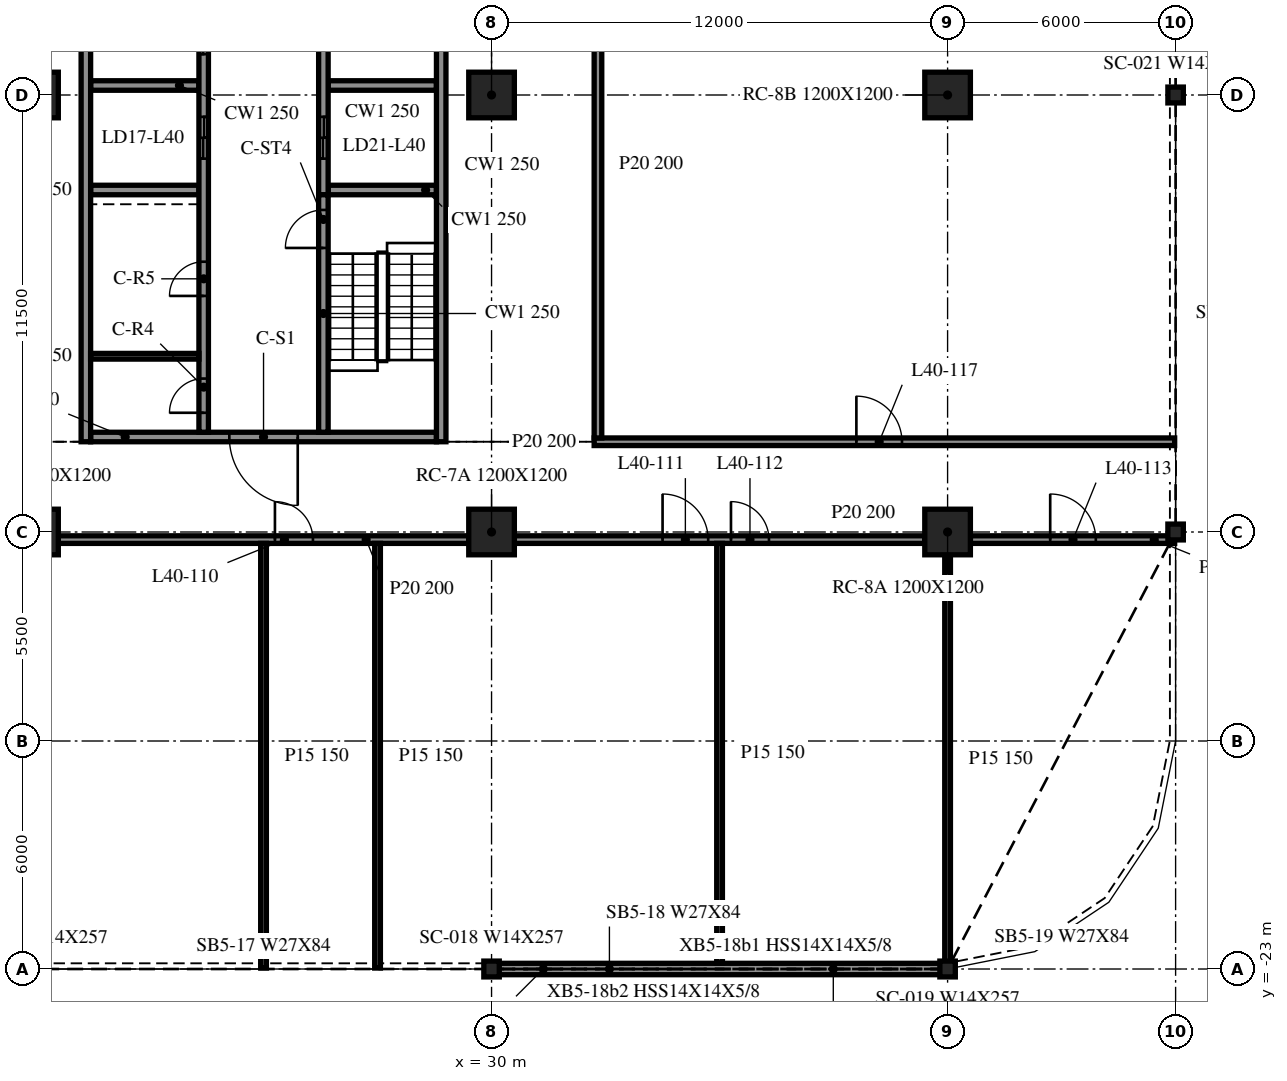
"""IFC4 building model, lengths in metres.
Left out: names, types, materials, properties, quantities, classifications, styles, units other than length and angle.
Written with IfcOpenShell. Run it as: python <this file> out.ifc"""

import sys

from ifc_helpers import new_model, si_unit, direction, frame, frame_2d, origin, origin_2d, place, context, subcontext, project, spatial, rectangle, i_section, extrude, element, fill, save


model = new_model("IFC4")
c1 = context("Model", 3, precision=1e-05, world=origin(), true_north=direction((0.0, 1.0)))
c2 = subcontext(c1, "Body", "Model", "MODEL_VIEW")
j1 = project(units=[si_unit("LENGTHUNIT", "METRE"), si_unit("PLANEANGLEUNIT", "RADIAN")], contexts=[c1])
p1 = place(None, origin())
s1 = spatial("IfcSite", under=j1, at=p1, CompositionType="ELEMENT")
p2 = place(p1, origin())
s2 = spatial("IfcBuilding", under=s1, at=p2, CompositionType="ELEMENT")
p3 = place(p2, frame((0.0, 0.0, 170.6)))
s3 = spatial("IfcBuildingStorey", under=s2, at=p3, CompositionType="ELEMENT", Elevation=170.6)
for number, where, z_axis, x_axis in (
    (1, (18.0, -11.5, -0.34), (0.0, 0.0, 1.0), (1.0, 0.0, 0.0)),
    (2, (18.0, 0.0, -0.34), (0.0, 0.0, 1.0), (1.0, 0.0, 0.0)),
    (3, (30.0, -11.5, -0.34), (0.0, 0.0, 1.0), (1.0, 0.0, 0.0)),
    (4, (30.0, 0.0, -0.34), (0.0, 0.0, 1.0), (1.0, 0.0, 0.0)),
    (5, (42.0, -11.5, -0.34), (0.0, 0.0, 1.0), (1.0, 0.0, 0.0)),
    (6, (42.0, 0.0, -0.34), (0.0, 0.0, 1.0), (1.0, 0.0, 0.0)),
):
    element("IfcColumn", number, at=place(p3, frame(where, z_axis=z_axis, x_axis=x_axis)), inside=s3, PredefinedType="COLUMN", context=c2, shape_type="SweptSolid", body=[
        extrude(rectangle(XDim=1.2, YDim=1.2, at=origin_2d()), origin(), (0.0, 0.0, 1.0), 3.8),
    ])
for number, where, z_axis, x_axis in (
    (7, (30.0, -23.0, -0.34), (0.0, 0.0, 1.0), (1.0, 0.0, 0.0)),
    (8, (42.0, -23.0, -0.34), (0.0, 0.0, 1.0), (1.0, 0.0, 0.0)),
    (9, (48.0, -11.5, -0.34), (0.0, 0.0, 1.0), (1.0, 0.0, 0.0)),
    (10, (48.0, 0.0, -0.34), (0.0, 0.0, 1.0), (1.0, 0.0, 0.0)),
):
    element("IfcColumn", number, at=place(p3, frame(where, z_axis=z_axis, x_axis=x_axis)), inside=s3, PredefinedType="COLUMN", context=c2, shape_type="SweptSolid", body=[
        extrude(i_section(OverallWidth=0.406, OverallDepth=0.417, WebThickness=0.03, FlangeThickness=0.048, at=origin_2d()), origin(), (0.0, 0.0, 1.0), 3.8),
    ])
p4 = place(p3, frame((30.015, -23.0, 0.0), z_axis=(0.0, 0.0, 1.0), x_axis=(1.0, 0.0, 0.0)))
e11 = element("IfcWall", 11, at=p4, inside=s3, PredefinedType="NOTDEFINED", context=c2, shape_type="SweptSolid", body=[
    extrude(rectangle(XDim=11.97, YDim=0.3, at=frame_2d((5.985, 0.0))), origin(), (0.0, 0.0, 1.0), 2.782),
])
p5 = place(p3, frame((19.325, 15.125, 0.0), z_axis=(0.0, 0.0, 1.0), x_axis=(0.0, -1.0, 0.0)))
e12 = element("IfcWall", 12, at=p5, inside=s3, PredefinedType="SOLIDWALL", context=c2, shape_type="SweptSolid", body=[
    extrude(rectangle(XDim=24.25, YDim=0.25, at=frame_2d((12.125, 0.0))), origin(), (0.0, 0.0, 1.0), 3.46),
])
p6 = place(p3, frame((28.675, -9.125, 0.0), z_axis=(0.0, 0.0, 1.0), x_axis=(0.0, 1.0, 0.0)))
e13 = element("IfcWall", 13, at=p6, inside=s3, PredefinedType="SOLIDWALL", context=c2, shape_type="SweptSolid", body=[
    extrude(rectangle(XDim=24.25, YDim=0.25, at=frame_2d((12.125, 0.0))), origin(), (0.0, 0.0, 1.0), 3.46),
])
p7 = place(p6, frame((13.075, 0.0, 0.0)))
e14 = element("IfcOpeningElement", 14, at=p7, cuts=e13, PredefinedType="OPENING", context=c2, shape_type="SweptSolid", body=[
    extrude(rectangle(XDim=0.9, YDim=2.1, at=frame_2d((0.45, 1.05))), frame((0.0, 0.135, 0.0), z_axis=(0.0, -1.0, 0.0), x_axis=(1.0, 0.0, 0.0)), (0.0, 0.0, 1.0), 0.27),
])
p8 = place(p6, frame((15.775, 0.0, 0.0)))
e15 = element("IfcOpeningElement", 15, at=p8, cuts=e13, PredefinedType="OPENING", context=c2, shape_type="SweptSolid", body=[
    extrude(rectangle(XDim=0.9, YDim=2.1, at=frame_2d((0.45, 1.05))), frame((0.0, 0.135, 0.0), z_axis=(0.0, -1.0, 0.0), x_axis=(1.0, 0.0, 0.0)), (0.0, 0.0, 1.0), 0.27),
])
p9 = place(p6, frame((19.125, 0.0, 0.0)))
e16 = element("IfcOpeningElement", 16, at=p9, cuts=e13, PredefinedType="OPENING", context=c2, shape_type="SweptSolid", body=[
    extrude(rectangle(XDim=0.9, YDim=2.1, at=frame_2d((0.45, 1.05))), frame((0.0, 0.135, 0.0), z_axis=(0.0, -1.0, 0.0), x_axis=(1.0, 0.0, 0.0)), (0.0, 0.0, 1.0), 0.27),
])
p10 = place(p6, frame((22.327, 0.0, 0.0)))
e17 = element("IfcOpeningElement", 17, at=p10, cuts=e13, PredefinedType="OPENING", context=c2, shape_type="SweptSolid", body=[
    extrude(rectangle(XDim=0.9, YDim=2.1, at=frame_2d((0.45, 1.05))), frame((0.0, 0.135, 0.0), z_axis=(0.0, -1.0, 0.0), x_axis=(1.0, 0.0, 0.0)), (0.0, 0.0, 1.0), 0.27),
])
p11 = place(p3, frame((28.55, -9.0, 0.0), z_axis=(0.0, 0.0, 1.0), x_axis=(-1.0, 0.0, 0.0)))
e18 = element("IfcWall", 18, at=p11, inside=s3, PredefinedType="SOLIDWALL", context=c2, shape_type="SweptSolid", body=[
    extrude(rectangle(XDim=9.1, YDim=0.25, at=frame_2d((4.55, 0.0))), origin(), (0.0, 0.0, 1.0), 3.46),
])
p12 = place(p11, frame((3.65, 0.0, 0.0)))
e19 = element("IfcOpeningElement", 19, at=p12, cuts=e18, PredefinedType="OPENING", context=c2, shape_type="SweptSolid", body=[
    extrude(rectangle(XDim=1.8, YDim=2.1, at=frame_2d((0.9, 1.05))), frame((0.0, 0.135, 0.0), z_axis=(0.0, -1.0, 0.0), x_axis=(1.0, 0.0, 0.0)), (0.0, 0.0, 1.0), 0.27),
])
p13 = place(p3, frame((22.425, -8.875, 0.0), z_axis=(0.0, 0.0, 1.0), x_axis=(0.0, 1.0, 0.0)))
e20 = element("IfcWall", 20, at=p13, inside=s3, PredefinedType="SOLIDWALL", context=c2, shape_type="SweptSolid", body=[
    extrude(rectangle(XDim=17.5, YDim=0.25, at=frame_2d((8.75, 0.0))), origin(), (0.0, 0.0, 1.0), 3.46),
])
p14 = place(p13, frame((7.2, 0.0, 0.0)))
e21 = element("IfcOpeningElement", 21, at=p14, cuts=e20, PredefinedType="OPENING", context=c2, shape_type="SweptSolid", body=[
    extrude(rectangle(XDim=1.1, YDim=2.1, at=frame_2d((0.55, 1.05))), frame((0.0, 0.135, 0.0), z_axis=(0.0, -1.0, 0.0), x_axis=(1.0, 0.0, 0.0)), (0.0, 0.0, 1.0), 0.27),
])
p15 = place(p13, frame((9.95, 0.0, 0.0)))
e22 = element("IfcOpeningElement", 22, at=p15, cuts=e20, PredefinedType="OPENING", context=c2, shape_type="SweptSolid", body=[
    extrude(rectangle(XDim=1.1, YDim=2.1, at=frame_2d((0.55, 1.05))), frame((0.0, 0.135, 0.0), z_axis=(0.0, -1.0, 0.0), x_axis=(1.0, 0.0, 0.0)), (0.0, 0.0, 1.0), 0.27),
])
p16 = place(p13, frame((12.7, 0.0, 0.0)))
e23 = element("IfcOpeningElement", 23, at=p16, cuts=e20, PredefinedType="OPENING", context=c2, shape_type="SweptSolid", body=[
    extrude(rectangle(XDim=1.1, YDim=2.1, at=frame_2d((0.55, 1.05))), frame((0.0, 0.135, 0.0), z_axis=(0.0, -1.0, 0.0), x_axis=(1.0, 0.0, 0.0)), (0.0, 0.0, 1.0), 0.27),
])
p17 = place(p13, frame((15.45, 0.0, 0.0)))
e24 = element("IfcOpeningElement", 24, at=p17, cuts=e20, PredefinedType="OPENING", context=c2, shape_type="SweptSolid", body=[
    extrude(rectangle(XDim=1.1, YDim=2.1, at=frame_2d((0.55, 1.05))), frame((0.0, 0.135, 0.0), z_axis=(0.0, -1.0, 0.0), x_axis=(1.0, 0.0, 0.0)), (0.0, 0.0, 1.0), 0.27),
])
p18 = place(p13, frame((0.512, 0.0, 0.0)))
e25 = element("IfcOpeningElement", 25, at=p18, cuts=e20, PredefinedType="OPENING", context=c2, shape_type="SweptSolid", body=[
    extrude(rectangle(XDim=0.9, YDim=2.1, at=frame_2d((0.45, 1.05))), frame((0.0, 0.135, 0.0), z_axis=(0.0, -1.0, 0.0), x_axis=(1.0, 0.0, 0.0)), (0.0, 0.0, 1.0), 0.27),
])
p19 = place(p13, frame((3.587, 0.0, 0.0)))
e26 = element("IfcOpeningElement", 26, at=p19, cuts=e20, PredefinedType="OPENING", context=c2, shape_type="SweptSolid", body=[
    extrude(rectangle(XDim=0.9, YDim=2.1, at=frame_2d((0.45, 1.05))), frame((0.0, 0.135, 0.0), z_axis=(0.0, -1.0, 0.0), x_axis=(1.0, 0.0, 0.0)), (0.0, 0.0, 1.0), 0.27),
])
p20 = place(p3, frame((25.575, -8.875, 0.0), z_axis=(0.0, 0.0, 1.0), x_axis=(0.0, 1.0, 0.0)))
e27 = element("IfcWall", 27, at=p20, inside=s3, PredefinedType="SOLIDWALL", context=c2, shape_type="SweptSolid", body=[
    extrude(rectangle(XDim=6.25, YDim=0.25, at=frame_2d((3.125, 0.0))), origin(), (0.0, 0.0, 1.0), 3.46),
])
p21 = place(p20, frame((4.85, 0.0, 0.0)))
e28 = element("IfcOpeningElement", 28, at=p21, cuts=e27, PredefinedType="OPENING", context=c2, shape_type="SweptSolid", body=[
    extrude(rectangle(XDim=1.0, YDim=2.1, at=frame_2d((0.5, 1.05))), frame((0.0, 0.135, 0.0), z_axis=(0.0, -1.0, 0.0), x_axis=(1.0, 0.0, 0.0)), (0.0, 0.0, 1.0), 0.27),
])
p22 = place(p3, frame((25.575, 14.875, 0.0), z_axis=(0.0, 0.0, 1.0), x_axis=(0.0, -1.0, 0.0)))
e29 = element("IfcWall", 29, at=p22, inside=s3, PredefinedType="SOLIDWALL", context=c2, shape_type="SweptSolid", body=[
    extrude(rectangle(XDim=17.5, YDim=0.25, at=frame_2d((8.75, 0.0))), origin(), (0.0, 0.0, 1.0), 3.46),
])
p23 = place(p22, frame((15.45, 0.0, 0.0)))
e30 = element("IfcOpeningElement", 30, at=p23, cuts=e29, PredefinedType="OPENING", context=c2, shape_type="SweptSolid", body=[
    extrude(rectangle(XDim=1.1, YDim=2.1, at=frame_2d((0.55, 1.05))), frame((0.0, 0.135, 0.0), z_axis=(0.0, -1.0, 0.0), x_axis=(1.0, 0.0, 0.0)), (0.0, 0.0, 1.0), 0.27),
])
p24 = place(p22, frame((12.8, 0.0, 0.0)))
e31 = element("IfcOpeningElement", 31, at=p24, cuts=e29, PredefinedType="OPENING", context=c2, shape_type="SweptSolid", body=[
    extrude(rectangle(XDim=0.9, YDim=2.1, at=frame_2d((0.45, 1.05))), frame((0.0, 0.135, 0.0), z_axis=(0.0, -1.0, 0.0), x_axis=(1.0, 0.0, 0.0)), (0.0, 0.0, 1.0), 0.27),
])
for number, where, z_axis, x_axis in (
    (32, (19.45, -2.5, 0.0), (0.0, 0.0, 1.0), (1.0, 0.0, 0.0)),
    (33, (19.45, 0.25, 0.0), (0.0, 0.0, 1.0), (1.0, 0.0, 0.0)),
    (34, (25.7, -2.5, 0.0), (0.0, 0.0, 1.0), (1.0, 0.0, 0.0)),
    (35, (25.7, 0.25, 0.0), (0.0, 0.0, 1.0), (1.0, 0.0, 0.0)),
):
    element("IfcWall", number, at=place(p3, frame(where, z_axis=z_axis, x_axis=x_axis)), inside=s3, PredefinedType="SOLIDWALL", context=c2, shape_type="SweptSolid", body=[
        extrude(rectangle(XDim=2.85, YDim=0.25, at=frame_2d((1.425, 0.0))), origin(), (0.0, 0.0, 1.0), 3.46),
    ])
p25 = place(p3, frame((19.45, -6.875, 0.0), z_axis=(0.0, 0.0, 1.0), x_axis=(1.0, 0.0, 0.0)))
e36 = element("IfcWall", 36, at=p25, inside=s3, PredefinedType="PARTITIONING", context=c2, shape_type="SweptSolid", body=[
    extrude(rectangle(XDim=2.85, YDim=0.15, at=frame_2d((1.425, 0.0))), origin(), (0.0, 0.0, 1.0), 3.46),
])
p26 = place(p3, frame((18.6, -11.7, 0.0), z_axis=(0.0, 0.0, 1.0), x_axis=(1.0, 0.0, 0.0)))
e37 = element("IfcWall", 37, at=p26, inside=s3, PredefinedType="PARTITIONING", context=c2, shape_type="SweptSolid", body=[
    extrude(rectangle(XDim=10.8, YDim=0.2, at=frame_2d((5.4, 0.0))), origin(), (0.0, 0.0, 1.0), 3.46),
])
p27 = place(p26, frame((5.7, 0.0, 0.0)))
e38 = element("IfcOpeningElement", 38, at=p27, cuts=e37, PredefinedType="OPENING", context=c2, shape_type="SweptSolid", body=[
    extrude(rectangle(XDim=1.0, YDim=2.1, at=frame_2d((0.5, 1.05))), frame((0.0, 0.11, 0.0), z_axis=(0.0, -1.0, 0.0), x_axis=(1.0, 0.0, 0.0)), (0.0, 0.0, 1.0), 0.22),
])
p28 = place(p3, frame((30.6, -11.7, 0.0), z_axis=(0.0, 0.0, 1.0), x_axis=(1.0, 0.0, 0.0)))
e39 = element("IfcWall", 39, at=p28, inside=s3, PredefinedType="PARTITIONING", context=c2, shape_type="SweptSolid", body=[
    extrude(rectangle(XDim=10.8, YDim=0.2, at=frame_2d((5.4, 0.0))), origin(), (0.0, 0.0, 1.0), 3.46),
])
p29 = place(p28, frame((3.9, 0.0, 0.0)))
e40 = element("IfcOpeningElement", 40, at=p29, cuts=e39, PredefinedType="OPENING", context=c2, shape_type="SweptSolid", body=[
    extrude(rectangle(XDim=1.2, YDim=2.1, at=frame_2d((0.6, 1.05))), frame((0.0, 0.11, 0.0), z_axis=(0.0, -1.0, 0.0), x_axis=(1.0, 0.0, 0.0)), (0.0, 0.0, 1.0), 0.22),
])
p30 = place(p28, frame((5.7, 0.0, 0.0)))
e41 = element("IfcOpeningElement", 41, at=p30, cuts=e39, PredefinedType="OPENING", context=c2, shape_type="SweptSolid", body=[
    extrude(rectangle(XDim=1.0, YDim=2.1, at=frame_2d((0.5, 1.05))), frame((0.0, 0.11, 0.0), z_axis=(0.0, -1.0, 0.0), x_axis=(1.0, 0.0, 0.0)), (0.0, 0.0, 1.0), 0.22),
])
p31 = place(p3, frame((42.6, -11.7, 0.0), z_axis=(0.0, 0.0, 1.0), x_axis=(1.0, 0.0, 0.0)))
e42 = element("IfcWall", 42, at=p31, inside=s3, PredefinedType="PARTITIONING", context=c2, shape_type="SweptSolid", body=[
    extrude(rectangle(XDim=5.375, YDim=0.2, at=frame_2d((2.688, 0.0))), origin(), (0.0, 0.0, 1.0), 3.46),
])
p32 = place(p31, frame((2.1, 0.0, 0.0)))
e43 = element("IfcOpeningElement", 43, at=p32, cuts=e42, PredefinedType="OPENING", context=c2, shape_type="SweptSolid", body=[
    extrude(rectangle(XDim=1.2, YDim=2.1, at=frame_2d((0.6, 1.05))), frame((0.0, 0.11, 0.0), z_axis=(0.0, -1.0, 0.0), x_axis=(1.0, 0.0, 0.0)), (0.0, 0.0, 1.0), 0.22),
])
p33 = place(p3, frame((32.7, -9.125, 0.0), z_axis=(0.0, 0.0, 1.0), x_axis=(1.0, 0.0, 0.0)))
e44 = element("IfcWall", 44, at=p33, inside=s3, PredefinedType="PARTITIONING", context=c2, shape_type="SweptSolid", body=[
    extrude(rectangle(XDim=15.275, YDim=0.2, at=frame_2d((7.638, 0.0))), origin(), (0.0, 0.0, 1.0), 3.46),
])
p34 = place(p33, frame((6.9, 0.0, 0.0)))
e45 = element("IfcOpeningElement", 45, at=p34, cuts=e44, PredefinedType="OPENING", context=c2, shape_type="SweptSolid", body=[
    extrude(rectangle(XDim=1.2, YDim=2.1, at=frame_2d((0.6, 1.05))), frame((0.0, 0.11, 0.0), z_axis=(0.0, -1.0, 0.0), x_axis=(1.0, 0.0, 0.0)), (0.0, 0.0, 1.0), 0.22),
])
for number, where, z_axis, x_axis in (
    (46, (24.0, -22.975, 0.0), (0.0, 0.0, 1.0), (0.0, 1.0, 0.0)),
    (47, (27.0, -22.975, 0.0), (0.0, 0.0, 1.0), (0.0, 1.0, 0.0)),
):
    element("IfcWall", number, at=place(p3, frame(where, z_axis=z_axis, x_axis=x_axis)), inside=s3, PredefinedType="PARTITIONING", context=c2, shape_type="SweptSolid", body=[
        extrude(rectangle(XDim=11.175, YDim=0.15, at=frame_2d((5.587, 0.0))), origin(), (0.0, 0.0, 1.0), 3.46),
    ])
p35 = place(p3, frame((32.8, -9.025, 0.0), z_axis=(0.0, 0.0, 1.0), x_axis=(0.0, 1.0, 0.0)))
e48 = element("IfcWall", 48, at=p35, inside=s3, PredefinedType="PARTITIONING", context=c2, shape_type="SweptSolid", body=[
    extrude(rectangle(XDim=24.05, YDim=0.2, at=frame_2d((12.025, 0.0))), origin(), (0.0, 0.0, 1.0), 3.46),
])
p36 = place(p35, frame((12.3, 0.0, 0.0)))
e49 = element("IfcOpeningElement", 49, at=p36, cuts=e48, PredefinedType="OPENING", context=c2, shape_type="SweptSolid", body=[
    extrude(rectangle(XDim=1.0, YDim=2.1, at=frame_2d((0.5, 1.05))), frame((0.0, 0.11, 0.0), z_axis=(0.0, -1.0, 0.0), x_axis=(1.0, 0.0, 0.0)), (0.0, 0.0, 1.0), 0.22),
])
p37 = place(p3, frame((36.0, -22.85, 0.0), z_axis=(0.0, 0.0, 1.0), x_axis=(0.0, 1.0, 0.0)))
e50 = element("IfcWall", 50, at=p37, inside=s3, PredefinedType="PARTITIONING", context=c2, shape_type="SweptSolid", body=[
    extrude(rectangle(XDim=11.05, YDim=0.15, at=frame_2d((5.525, 0.0))), origin(), (0.0, 0.0, 1.0), 3.46),
])
p38 = place(p3, frame((42.0, -22.847, 0.0), z_axis=(0.0, 0.0, 1.0), x_axis=(0.0, 1.0, 0.0)))
e51 = element("IfcWall", 51, at=p38, inside=s3, PredefinedType="PARTITIONING", context=c2, shape_type="SweptSolid", body=[
    extrude(rectangle(XDim=10.747, YDim=0.15, at=frame_2d((5.374, 0.0))), origin(), (0.0, 0.0, 1.0), 3.46),
])
p39 = place(p12, origin())
e52 = element("IfcDoor", 52, at=p39, inside=s3, OperationType="DOUBLE_DOOR_SINGLE_SWING", PredefinedType="DOOR", context=c2, shape_type="SweptSolid", body=[
    extrude(rectangle(XDim=1.8, YDim=2.1, at=frame_2d((0.9, 1.05))), frame((0.0, 0.025, 0.0), z_axis=(0.0, -1.0, 0.0), x_axis=(1.0, 0.0, 0.0)), (0.0, 0.0, 1.0), 0.05),
])
fill(e19, e52)
p40 = place(p23, origin())
e53 = element("IfcDoor", 53, at=p40, inside=s3, OperationType="DOUBLE_DOOR_SLIDING", PredefinedType="DOOR", context=c2, shape_type="SweptSolid", body=[
    extrude(rectangle(XDim=1.1, YDim=2.1, at=frame_2d((0.55, 1.05))), frame((0.0, 0.025, 0.0), z_axis=(0.0, -1.0, 0.0), x_axis=(1.0, 0.0, 0.0)), (0.0, 0.0, 1.0), 0.05),
])
fill(e30, e53)
p41 = place(p14, origin())
e54 = element("IfcDoor", 54, at=p41, inside=s3, OperationType="DOUBLE_DOOR_SLIDING", PredefinedType="DOOR", context=c2, shape_type="SweptSolid", body=[
    extrude(rectangle(XDim=1.1, YDim=2.1, at=frame_2d((0.55, 1.05))), frame((0.0, 0.025, 0.0), z_axis=(0.0, -1.0, 0.0), x_axis=(1.0, 0.0, 0.0)), (0.0, 0.0, 1.0), 0.05),
])
fill(e21, e54)
p42 = place(p15, origin())
e55 = element("IfcDoor", 55, at=p42, inside=s3, OperationType="DOUBLE_DOOR_SLIDING", PredefinedType="DOOR", context=c2, shape_type="SweptSolid", body=[
    extrude(rectangle(XDim=1.1, YDim=2.1, at=frame_2d((0.55, 1.05))), frame((0.0, 0.025, 0.0), z_axis=(0.0, -1.0, 0.0), x_axis=(1.0, 0.0, 0.0)), (0.0, 0.0, 1.0), 0.05),
])
fill(e22, e55)
p43 = place(p18, origin())
e56 = element("IfcDoor", 56, at=p43, inside=s3, OperationType="SINGLE_SWING_RIGHT", PredefinedType="DOOR", context=c2, shape_type="SweptSolid", body=[
    extrude(rectangle(XDim=0.9, YDim=2.1, at=frame_2d((0.45, 1.05))), frame((0.0, 0.025, 0.0), z_axis=(0.0, -1.0, 0.0), x_axis=(1.0, 0.0, 0.0)), (0.0, 0.0, 1.0), 0.05),
])
fill(e25, e56)
p44 = place(p19, origin())
e57 = element("IfcDoor", 57, at=p44, inside=s3, OperationType="SINGLE_SWING_LEFT", PredefinedType="DOOR", context=c2, shape_type="SweptSolid", body=[
    extrude(rectangle(XDim=0.9, YDim=2.1, at=frame_2d((0.45, 1.05))), frame((0.0, 0.025, 0.0), z_axis=(0.0, -1.0, 0.0), x_axis=(1.0, 0.0, 0.0)), (0.0, 0.0, 1.0), 0.05),
])
fill(e26, e57)
p45 = place(p21, origin())
e58 = element("IfcDoor", 58, at=p45, inside=s3, OperationType="SINGLE_SWING_LEFT", PredefinedType="DOOR", context=c2, shape_type="SweptSolid", body=[
    extrude(rectangle(XDim=1.0, YDim=2.1, at=frame_2d((0.5, 1.05))), frame((0.0, 0.025, 0.0), z_axis=(0.0, -1.0, 0.0), x_axis=(1.0, 0.0, 0.0)), (0.0, 0.0, 1.0), 0.05),
])
fill(e28, e58)
p46 = place(p27, origin())
e59 = element("IfcDoor", 59, at=p46, inside=s3, OperationType="SINGLE_SWING_LEFT", PredefinedType="DOOR", context=c2, shape_type="SweptSolid", body=[
    extrude(rectangle(XDim=1.0, YDim=2.1, at=frame_2d((0.5, 1.05))), frame((0.0, 0.025, 0.0), z_axis=(0.0, -1.0, 0.0), x_axis=(1.0, 0.0, 0.0)), (0.0, 0.0, 1.0), 0.05),
])
fill(e38, e59)
p47 = place(p29, origin())
e60 = element("IfcDoor", 60, at=p47, inside=s3, OperationType="SINGLE_SWING_RIGHT", PredefinedType="DOOR", context=c2, shape_type="SweptSolid", body=[
    extrude(rectangle(XDim=1.2, YDim=2.1, at=frame_2d((0.6, 1.05))), frame((0.0, 0.025, 0.0), z_axis=(0.0, -1.0, 0.0), x_axis=(1.0, 0.0, 0.0)), (0.0, 0.0, 1.0), 0.05),
])
fill(e40, e60)
p48 = place(p30, origin())
e61 = element("IfcDoor", 61, at=p48, inside=s3, OperationType="SINGLE_SWING_LEFT", PredefinedType="DOOR", context=c2, shape_type="SweptSolid", body=[
    extrude(rectangle(XDim=1.0, YDim=2.1, at=frame_2d((0.5, 1.05))), frame((0.0, 0.025, 0.0), z_axis=(0.0, -1.0, 0.0), x_axis=(1.0, 0.0, 0.0)), (0.0, 0.0, 1.0), 0.05),
])
fill(e41, e61)
p49 = place(p32, origin())
e62 = element("IfcDoor", 62, at=p49, inside=s3, OperationType="SINGLE_SWING_LEFT", PredefinedType="DOOR", context=c2, shape_type="SweptSolid", body=[
    extrude(rectangle(XDim=1.2, YDim=2.1, at=frame_2d((0.6, 1.05))), frame((0.0, 0.025, 0.0), z_axis=(0.0, -1.0, 0.0), x_axis=(1.0, 0.0, 0.0)), (0.0, 0.0, 1.0), 0.05),
])
fill(e43, e62)
p50 = place(p34, origin())
e63 = element("IfcDoor", 63, at=p50, inside=s3, OperationType="SINGLE_SWING_LEFT", PredefinedType="DOOR", context=c2, shape_type="SweptSolid", body=[
    extrude(rectangle(XDim=1.2, YDim=2.1, at=frame_2d((0.6, 1.05))), frame((0.0, 0.025, 0.0), z_axis=(0.0, -1.0, 0.0), x_axis=(1.0, 0.0, 0.0)), (0.0, 0.0, 1.0), 0.05),
])
fill(e45, e63)
save(model, sys.argv[1])
